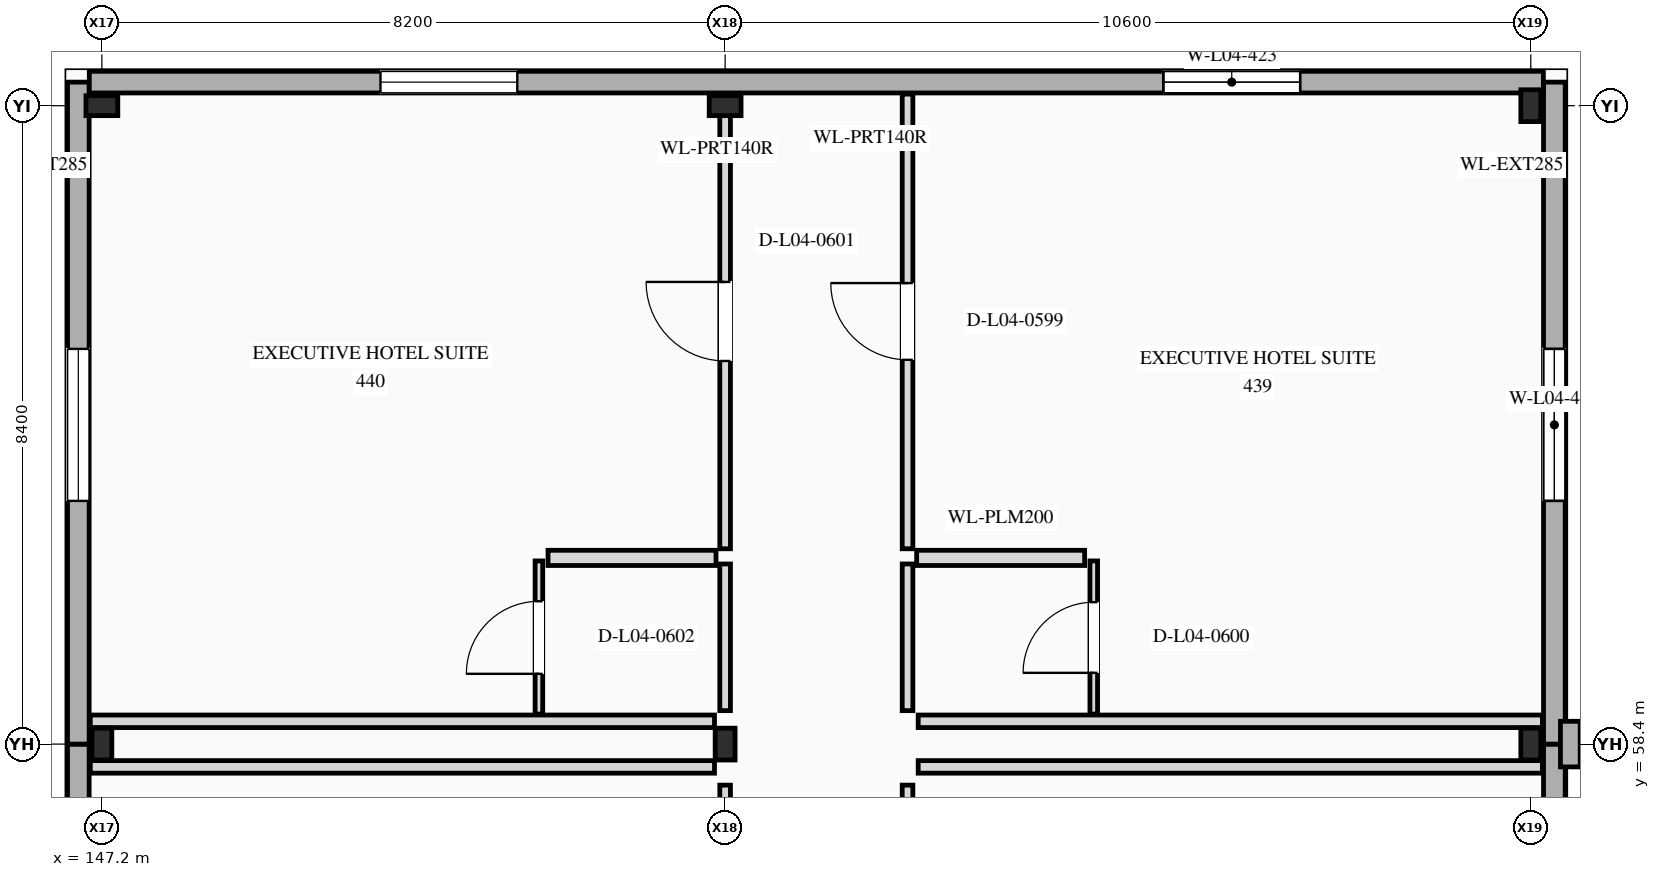
"""IFC4 building model, lengths in metres.
Left out: names, types, materials, properties, quantities, classifications, styles, units other than length and angle.
Written with IfcOpenShell. Run it as: python <this file> out.ifc"""

import sys

from ifc_helpers import new_model, si_unit, direction, frame, frame_2d, origin, origin_2d, place, context, subcontext, project, spatial, rectangle, i_section, extrude, element, fill, save


model = new_model("IFC4")
c1 = context("Model", 3, precision=1e-05, world=origin(), true_north=direction((0.0, 1.0)))
c2 = subcontext(c1, "Body", "Model", "MODEL_VIEW")
j1 = project(units=[si_unit("LENGTHUNIT", "METRE"), si_unit("PLANEANGLEUNIT", "RADIAN")], contexts=[c1])
p1 = place(None, origin())
s1 = spatial("IfcSite", under=j1, at=p1, CompositionType="ELEMENT")
p2 = place(p1, origin())
s2 = spatial("IfcBuilding", under=s1, at=p2, CompositionType="ELEMENT")
p3 = place(p2, frame((0.0, 0.0, 19.5)))
s3 = spatial("IfcBuildingStorey", under=s2, at=p3, CompositionType="ELEMENT", Elevation=19.5)
for number, where, z_axis, x_axis in (
    (1, (147.2, 58.4, 0.0), (0.0, 0.0, 1.0), (1.0, 0.0, 0.0)),
    (2, (147.2, 66.8, 0.0), (0.0, 0.0, 1.0), (0.0, 1.0, 0.0)),
    (3, (155.4, 58.4, 0.0), (0.0, 0.0, 1.0), (1.0, 0.0, 0.0)),
    (4, (155.4, 66.8, 0.0), (0.0, 0.0, 1.0), (0.0, 1.0, 0.0)),
    (5, (166.0, 58.4, 0.0), (0.0, 0.0, 1.0), (1.0, 0.0, 0.0)),
    (6, (166.0, 66.8, 0.0), (0.0, 0.0, 1.0), (1.0, 0.0, 0.0)),
):
    element("IfcColumn", number, at=place(p3, frame(where, z_axis=z_axis, x_axis=x_axis)), inside=s3, PredefinedType="COLUMN", context=c2, shape_type="SweptSolid", body=[
        extrude(i_section(OverallWidth=0.262, OverallDepth=0.419, WebThickness=0.012, FlangeThickness=0.019, at=origin_2d()), origin(), (0.0, 0.0, 1.0), 3.9),
    ])
p4 = place(p3, frame((166.31, 56.26, 0.0), z_axis=(0.0, 0.0, 1.0), x_axis=(0.0, 1.0, 0.0)))
e7 = element("IfcWall", 7, at=p4, inside=s3, PredefinedType="STANDARD", context=c2, shape_type="SweptSolid", body=[
    extrude(rectangle(XDim=2.14, YDim=0.285, at=frame_2d((1.07, 0.0))), origin(), (0.0, 0.0, 1.0), 3.9),
])
p5 = place(p3, frame((166.31, 58.4, 0.0), z_axis=(0.0, 0.0, 1.0), x_axis=(0.0, 1.0, 0.0)))
e8 = element("IfcWall", 8, at=p5, inside=s3, PredefinedType="STANDARD", context=c2, shape_type="SweptSolid", body=[
    extrude(rectangle(XDim=8.71, YDim=0.285, at=frame_2d((4.355, 0.0))), origin(), (0.0, 0.0, 1.0), 3.9),
])
p6 = place(p5, frame((3.2, 0.0, 0.85)))
e9 = element("IfcOpeningElement", 9, at=p6, cuts=e8, PredefinedType="OPENING", context=c2, shape_type="SweptSolid", body=[
    extrude(rectangle(XDim=2.0, YDim=1.65, at=frame_2d((1.0, 0.825))), frame((0.0, 0.152, 0.0), z_axis=(0.0, -1.0, 0.0), x_axis=(1.0, 0.0, 0.0)), (0.0, 0.0, 1.0), 0.305),
])
p7 = place(p3, frame((166.52, 58.1, 0.0), z_axis=(0.0, 0.0, 1.0), x_axis=(0.0, 1.0, 0.0)))
e10 = element("IfcWall", 10, at=p7, inside=s3, PredefinedType="ELEMENTEDWALL", context=c2, shape_type="SweptSolid", body=[
    extrude(rectangle(XDim=0.6, YDim=0.26, at=frame_2d((0.3, 0.0))), origin(), (0.0, 0.0, 1.0), 3.9),
])
p8 = place(p3, frame((146.89, 50.0, 0.0), z_axis=(0.0, 0.0, 1.0), x_axis=(0.0, 1.0, 0.0)))
e11 = element("IfcWall", 11, at=p8, inside=s3, PredefinedType="STANDARD", context=c2, shape_type="SweptSolid", body=[
    extrude(rectangle(XDim=8.4, YDim=0.285, at=frame_2d((4.2, 0.0))), origin(), (0.0, 0.0, 1.0), 3.9),
])
p9 = place(p8, frame((3.225, 0.0, 0.85)))
e12 = element("IfcOpeningElement", 12, at=p9, cuts=e11, PredefinedType="OPENING", context=c2, shape_type="SweptSolid", body=[
    extrude(rectangle(XDim=1.95, YDim=1.85, at=frame_2d((0.975, 0.925))), frame((0.0, 0.152, 0.0), z_axis=(0.0, -1.0, 0.0), x_axis=(1.0, 0.0, 0.0)), (0.0, 0.0, 1.0), 0.305),
])
p10 = place(p3, frame((146.89, 58.4, 0.0), z_axis=(0.0, 0.0, 1.0), x_axis=(0.0, 1.0, 0.0)))
e13 = element("IfcWall", 13, at=p10, inside=s3, PredefinedType="STANDARD", context=c2, shape_type="SweptSolid", body=[
    extrude(rectangle(XDim=8.71, YDim=0.285, at=frame_2d((4.355, 0.0))), origin(), (0.0, 0.0, 1.0), 3.9),
])
p11 = place(p10, frame((3.2, 0.0, 0.85)))
e14 = element("IfcOpeningElement", 14, at=p11, cuts=e13, PredefinedType="OPENING", context=c2, shape_type="SweptSolid", body=[
    extrude(rectangle(XDim=2.0, YDim=1.65, at=frame_2d((1.0, 0.825))), frame((0.0, 0.152, 0.0), z_axis=(0.0, -1.0, 0.0), x_axis=(1.0, 0.0, 0.0)), (0.0, 0.0, 1.0), 0.305),
])
p12 = place(p3, frame((166.166, 67.11, 0.0), z_axis=(0.0, 0.0, 1.0), x_axis=(-1.0, 0.0, 0.0)))
e15 = element("IfcWall", 15, at=p12, inside=s3, PredefinedType="STANDARD", context=c2, shape_type="SweptSolid", body=[
    extrude(rectangle(XDim=19.131, YDim=0.285, at=frame_2d((9.565, 0.0))), origin(), (0.0, 0.0, 1.0), 3.9),
])
p13 = place(p12, frame((3.2, 0.0, 0.88)))
e16 = element("IfcOpeningElement", 16, at=p13, cuts=e15, PredefinedType="OPENING", context=c2, shape_type="SweptSolid", body=[
    extrude(rectangle(XDim=1.8, YDim=1.8, at=frame_2d((0.9, 0.9))), frame((0.0, 0.152, 0.0), z_axis=(0.0, -1.0, 0.0), x_axis=(1.0, 0.0, 0.0)), (0.0, 0.0, 1.0), 0.305),
])
p14 = place(p12, frame((13.5, 0.0, 0.88)))
e17 = element("IfcOpeningElement", 17, at=p14, cuts=e15, PredefinedType="OPENING", context=c2, shape_type="SweptSolid", body=[
    extrude(rectangle(XDim=1.8, YDim=1.8, at=frame_2d((0.9, 0.9))), frame((0.0, 0.152, 0.0), z_axis=(0.0, -1.0, 0.0), x_axis=(1.0, 0.0, 0.0)), (0.0, 0.0, 1.0), 0.305),
])
p15 = place(p3, frame((157.8, 52.57, 0.0), z_axis=(0.0, 0.0, 1.0), x_axis=(0.0, 1.0, 0.0)))
e18 = element("IfcWall", 18, at=p15, inside=s3, PredefinedType="PARTITIONING", context=c2, shape_type="SweptSolid", body=[
    extrude(rectangle(XDim=5.29, YDim=0.14, at=frame_2d((2.645, 0.0))), origin(), (0.0, 0.0, 1.0), 3.585),
])
p16 = place(p15, frame((2.17, 0.0, 0.0)))
e19 = element("IfcOpeningElement", 19, at=p16, cuts=e18, PredefinedType="OPENING", context=c2, shape_type="SweptSolid", body=[
    extrude(rectangle(XDim=0.95, YDim=2.3, at=frame_2d((0.475, 1.15))), frame((0.0, 0.08, 0.0), z_axis=(0.0, -1.0, 0.0), x_axis=(1.0, 0.0, 0.0)), (0.0, 0.0, 1.0), 0.16),
])
p17 = place(p3, frame((157.94, 58.1, 0.0), z_axis=(0.0, 0.0, 1.0), x_axis=(1.0, 0.0, 0.0)))
e20 = element("IfcWall", 20, at=p17, inside=s3, PredefinedType="PARTITIONING", context=c2, shape_type="SweptSolid", body=[
    extrude(rectangle(XDim=8.213, YDim=0.165, at=frame_2d((4.106, 0.0))), origin(), (0.0, 0.0, 1.0), 2.975),
])
p18 = place(p3, frame((155.4, 52.57, 0.0), z_axis=(0.0, 0.0, 1.0), x_axis=(0.0, 1.0, 0.0)))
e21 = element("IfcWall", 21, at=p18, inside=s3, PredefinedType="PARTITIONING", context=c2, shape_type="SweptSolid", body=[
    extrude(rectangle(XDim=5.29, YDim=0.14, at=frame_2d((2.645, 0.0))), origin(), (0.0, 0.0, 1.0), 2.975),
])
p19 = place(p18, frame((2.155, 0.0, 0.0)))
e22 = element("IfcOpeningElement", 22, at=p19, cuts=e21, PredefinedType="OPENING", context=c2, shape_type="SweptSolid", body=[
    extrude(rectangle(XDim=0.98, YDim=2.35, at=frame_2d((0.49, 1.175))), frame((0.0, 0.08, 0.0), z_axis=(0.0, -1.0, 0.0), x_axis=(1.0, 0.0, 0.0)), (0.0, 0.0, 1.0), 0.16),
])
p20 = place(p3, frame((147.048, 58.1, 0.0), z_axis=(0.0, 0.0, 1.0), x_axis=(1.0, 0.0, 0.0)))
e23 = element("IfcWall", 23, at=p20, inside=s3, PredefinedType="PARTITIONING", context=c2, shape_type="SweptSolid", body=[
    extrude(rectangle(XDim=8.212, YDim=0.165, at=frame_2d((4.106, 0.0))), origin(), (0.0, 0.0, 1.0), 2.998),
])
p21 = place(p3, frame((157.8, 58.84, 0.0), z_axis=(0.0, 0.0, 1.0), x_axis=(0.0, 1.0, 0.0)))
e24 = element("IfcWall", 24, at=p21, inside=s3, PredefinedType="PARTITIONING", context=c2, shape_type="SweptSolid", body=[
    extrude(rectangle(XDim=1.93, YDim=0.14, at=frame_2d((0.965, 0.0))), origin(), (0.0, 0.0, 1.0), 3.143),
])
p22 = place(p3, frame((157.8, 60.97, 0.0), z_axis=(0.0, 0.0, 1.0), x_axis=(0.0, 1.0, 0.0)))
e25 = element("IfcWall", 25, at=p22, inside=s3, PredefinedType="PARTITIONING", context=c2, shape_type="SweptSolid", body=[
    extrude(rectangle(XDim=5.982, YDim=0.14, at=frame_2d((2.991, 0.0))), origin(), (0.0, 0.0, 1.0), 2.998),
])
p23 = place(p22, frame((2.486, 0.0, 0.0)))
e26 = element("IfcOpeningElement", 26, at=p23, cuts=e25, PredefinedType="OPENING", context=c2, shape_type="SweptSolid", body=[
    extrude(rectangle(XDim=1.01, YDim=2.35, at=frame_2d((0.505, 1.175))), frame((0.0, 0.08, 0.0), z_axis=(0.0, -1.0, 0.0), x_axis=(1.0, 0.0, 0.0)), (0.0, 0.0, 1.0), 0.16),
])
p24 = place(p3, frame((157.94, 58.7, 0.0), z_axis=(0.0, 0.0, 1.0), x_axis=(1.0, 0.0, 0.0)))
e27 = element("IfcWall", 27, at=p24, inside=s3, PredefinedType="PARTITIONING", context=c2, shape_type="SweptSolid", body=[
    extrude(rectangle(XDim=8.213, YDim=0.165, at=frame_2d((4.106, 0.0))), origin(), (0.0, 0.0, 1.0), 2.975),
])
p25 = place(p3, frame((157.92, 60.85, 0.0), z_axis=(0.0, 0.0, 1.0), x_axis=(1.0, 0.0, 0.0)))
e28 = element("IfcWall", 28, at=p25, inside=s3, PredefinedType="PLUMBINGWALL", context=c2, shape_type="SweptSolid", body=[
    extrude(rectangle(XDim=2.21, YDim=0.2, at=frame_2d((1.105, 0.0))), origin(), (0.0, 0.0, 1.0), 3.585),
])
p26 = place(p3, frame((160.25, 58.794, 0.0), z_axis=(0.0, 0.0, 1.0), x_axis=(0.0, 1.0, 0.0)))
e29 = element("IfcWall", 29, at=p26, inside=s3, PredefinedType="PARTITIONING", context=c2, shape_type="SweptSolid", body=[
    extrude(rectangle(XDim=2.016, YDim=0.1, at=frame_2d((1.008, 0.0))), origin(), (0.0, 0.0, 1.0), 3.143),
])
p27 = place(p26, frame((0.543, 0.0, 0.0)))
e30 = element("IfcOpeningElement", 30, at=p27, cuts=e29, PredefinedType="OPENING", context=c2, shape_type="SweptSolid", body=[
    extrude(rectangle(XDim=0.93, YDim=2.14, at=frame_2d((0.465, 1.07))), frame((0.0, 0.06, 0.0), z_axis=(0.0, -1.0, 0.0), x_axis=(1.0, 0.0, 0.0)), (0.0, 0.0, 1.0), 0.12),
])
p28 = place(p3, frame((155.4, 58.84, 0.0), z_axis=(0.0, 0.0, 1.0), x_axis=(0.0, 1.0, 0.0)))
e31 = element("IfcWall", 31, at=p28, inside=s3, PredefinedType="PARTITIONING", context=c2, shape_type="SweptSolid", body=[
    extrude(rectangle(XDim=1.93, YDim=0.14, at=frame_2d((0.965, 0.0))), origin(), (0.0, 0.0, 1.0), 3.059),
])
p29 = place(p3, frame((155.4, 60.97, 0.0), z_axis=(0.0, 0.0, 1.0), x_axis=(0.0, 1.0, 0.0)))
e32 = element("IfcWall", 32, at=p29, inside=s3, PredefinedType="PARTITIONING", context=c2, shape_type="SweptSolid", body=[
    extrude(rectangle(XDim=5.982, YDim=0.14, at=frame_2d((2.991, 0.0))), origin(), (0.0, 0.0, 1.0), 2.998),
])
p30 = place(p29, frame((2.471, 0.0, 0.0)))
e33 = element("IfcOpeningElement", 33, at=p30, cuts=e32, PredefinedType="OPENING", context=c2, shape_type="SweptSolid", body=[
    extrude(rectangle(XDim=1.04, YDim=2.4, at=frame_2d((0.52, 1.2))), frame((0.0, 0.08, 0.0), z_axis=(0.0, -1.0, 0.0), x_axis=(1.0, 0.0, 0.0)), (0.0, 0.0, 1.0), 0.16),
])
p31 = place(p3, frame((147.048, 58.7, 0.0), z_axis=(0.0, 0.0, 1.0), x_axis=(1.0, 0.0, 0.0)))
e34 = element("IfcWall", 34, at=p31, inside=s3, PredefinedType="PARTITIONING", context=c2, shape_type="SweptSolid", body=[
    extrude(rectangle(XDim=8.212, YDim=0.165, at=frame_2d((4.106, 0.0))), origin(), (0.0, 0.0, 1.0), 2.998),
])
p32 = place(p3, frame((153.07, 60.85, 0.0), z_axis=(0.0, 0.0, 1.0), x_axis=(1.0, 0.0, 0.0)))
e35 = element("IfcWall", 35, at=p32, inside=s3, PredefinedType="PLUMBINGWALL", context=c2, shape_type="SweptSolid", body=[
    extrude(rectangle(XDim=2.21, YDim=0.2, at=frame_2d((1.105, 0.0))), origin(), (0.0, 0.0, 1.0), 3.585),
])
p33 = place(p3, frame((152.95, 58.794, 0.0), z_axis=(0.0, 0.0, 1.0), x_axis=(0.0, 1.0, 0.0)))
e36 = element("IfcWall", 36, at=p33, inside=s3, PredefinedType="PARTITIONING", context=c2, shape_type="SweptSolid", body=[
    extrude(rectangle(XDim=2.016, YDim=0.1, at=frame_2d((1.008, 0.0))), origin(), (0.0, 0.0, 1.0), 3.193),
])
p34 = place(p33, frame((0.53, 0.0, 0.0)))
e37 = element("IfcOpeningElement", 37, at=p34, cuts=e36, PredefinedType="OPENING", context=c2, shape_type="SweptSolid", body=[
    extrude(rectangle(XDim=0.955, YDim=2.14, at=frame_2d((0.478, 1.07))), frame((0.0, 0.06, 0.0), z_axis=(0.0, -1.0, 0.0), x_axis=(1.0, 0.0, 0.0)), (0.0, 0.0, 1.0), 0.12),
])
p35 = place(p6, origin())
e38 = element("IfcWindow", 38, at=p35, inside=s3, PartitioningType="SINGLE_PANEL", PredefinedType="WINDOW", context=c2, shape_type="SweptSolid", body=[
    extrude(rectangle(XDim=2.0, YDim=1.65, at=frame_2d((1.0, 0.825))), frame((0.0, 0.03, 0.0), z_axis=(0.0, -1.0, 0.0), x_axis=(1.0, 0.0, 0.0)), (0.0, 0.0, 1.0), 0.06),
])
fill(e9, e38)
p36 = place(p11, origin())
e39 = element("IfcWindow", 39, at=p36, inside=s3, PartitioningType="SINGLE_PANEL", PredefinedType="WINDOW", context=c2, shape_type="SweptSolid", body=[
    extrude(rectangle(XDim=2.0, YDim=1.65, at=frame_2d((1.0, 0.825))), frame((0.0, 0.03, 0.0), z_axis=(0.0, -1.0, 0.0), x_axis=(1.0, 0.0, 0.0)), (0.0, 0.0, 1.0), 0.06),
])
fill(e14, e39)
p37 = place(p13, origin())
e40 = element("IfcWindow", 40, at=p37, inside=s3, PartitioningType="SINGLE_PANEL", PredefinedType="WINDOW", context=c2, shape_type="SweptSolid", body=[
    extrude(rectangle(XDim=1.8, YDim=1.8, at=frame_2d((0.9, 0.9))), frame((0.0, 0.03, 0.0), z_axis=(0.0, -1.0, 0.0), x_axis=(1.0, 0.0, 0.0)), (0.0, 0.0, 1.0), 0.06),
])
fill(e16, e40)
p38 = place(p14, origin())
e41 = element("IfcWindow", 41, at=p38, inside=s3, PartitioningType="SINGLE_PANEL", PredefinedType="WINDOW", context=c2, shape_type="SweptSolid", body=[
    extrude(rectangle(XDim=1.8, YDim=1.8, at=frame_2d((0.9, 0.9))), frame((0.0, 0.03, 0.0), z_axis=(0.0, -1.0, 0.0), x_axis=(1.0, 0.0, 0.0)), (0.0, 0.0, 1.0), 0.06),
])
fill(e17, e41)
p39 = place(p23, origin())
e42 = element("IfcDoor", 42, at=p39, inside=s3, OperationType="SINGLE_SWING_RIGHT", PredefinedType="DOOR", context=c2, shape_type="SweptSolid", body=[
    extrude(rectangle(XDim=1.01, YDim=2.35, at=frame_2d((0.505, 1.175))), frame((0.0, 0.025, 0.0), z_axis=(0.0, -1.0, 0.0), x_axis=(1.0, 0.0, 0.0)), (0.0, 0.0, 1.0), 0.05),
])
fill(e26, e42)
p40 = place(p27, origin())
e43 = element("IfcDoor", 43, at=p40, inside=s3, OperationType="SINGLE_SWING_LEFT", PredefinedType="DOOR", context=c2, shape_type="SweptSolid", body=[
    extrude(rectangle(XDim=0.93, YDim=2.14, at=frame_2d((0.465, 1.07))), frame((0.0, 0.025, 0.0), z_axis=(0.0, -1.0, 0.0), x_axis=(1.0, 0.0, 0.0)), (0.0, 0.0, 1.0), 0.05),
])
fill(e30, e43)
p41 = place(p30, origin())
e44 = element("IfcDoor", 44, at=p41, inside=s3, OperationType="SINGLE_SWING_RIGHT", PredefinedType="DOOR", context=c2, shape_type="SweptSolid", body=[
    extrude(rectangle(XDim=1.04, YDim=2.4, at=frame_2d((0.52, 1.2))), frame((0.0, 0.025, 0.0), z_axis=(0.0, -1.0, 0.0), x_axis=(1.0, 0.0, 0.0)), (0.0, 0.0, 1.0), 0.05),
])
fill(e33, e44)
p42 = place(p34, origin())
e45 = element("IfcDoor", 45, at=p42, inside=s3, OperationType="SINGLE_SWING_LEFT", PredefinedType="DOOR", context=c2, shape_type="SweptSolid", body=[
    extrude(rectangle(XDim=0.955, YDim=2.14, at=frame_2d((0.478, 1.07))), frame((0.0, 0.025, 0.0), z_axis=(0.0, -1.0, 0.0), x_axis=(1.0, 0.0, 0.0)), (0.0, 0.0, 1.0), 0.05),
])
fill(e37, e45)
save(model, sys.argv[1])
